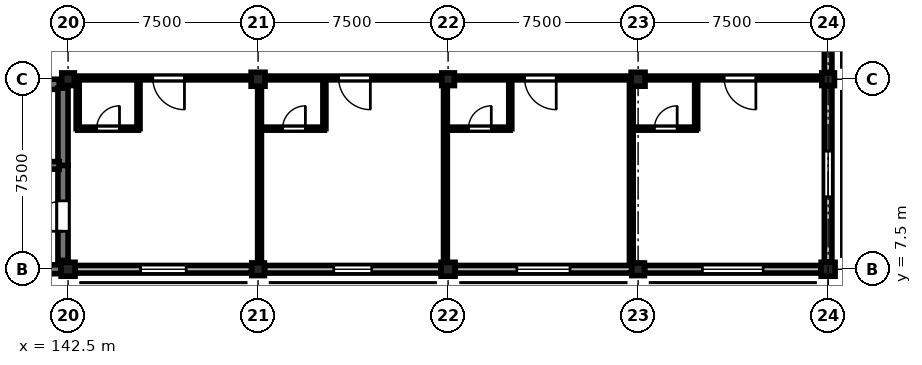
"""IFC4 building model, lengths in metres.
Left out: names, types, materials, properties, quantities, classifications, styles, units other than length and angle.
Written with IfcOpenShell. Run it as: python <this file> out.ifc"""

import sys

from ifc_helpers import new_model, si_unit, direction, frame, frame_2d, origin, origin_2d, place, context, subcontext, project, spatial, rectangle, extrude, element, fill, save


model = new_model("IFC4")
c1 = context("Model", 3, precision=1e-05, world=origin(), true_north=direction((0.0, 1.0)))
c2 = subcontext(c1, "Body", "Model", "MODEL_VIEW")
j1 = project(units=[si_unit("LENGTHUNIT", "METRE"), si_unit("PLANEANGLEUNIT", "RADIAN")], contexts=[c1])
p1 = place(None, origin())
s1 = spatial("IfcSite", under=j1, at=p1, CompositionType="ELEMENT")
p2 = place(p1, origin())
s2 = spatial("IfcBuilding", under=s1, at=p2, CompositionType="ELEMENT")
p3 = place(p2, frame((0.0, 0.0, 17.85)))
s3 = spatial("IfcBuildingStorey", under=s2, at=p3, CompositionType="ELEMENT", Elevation=17.85)
p4 = place(p3, frame((142.5, 7.5, 0.0), z_axis=(0.0, 0.0, 1.0), x_axis=(1.0, 0.0, 0.0)))
e1 = element("IfcColumn", 1, at=p4, inside=s3, PredefinedType="COLUMN", context=c2, shape_type="SweptSolid", body=[
    extrude(rectangle(XDim=0.55, YDim=0.55, at=origin_2d()), origin(), (0.0, 0.0, 1.0), 4.05),
])
for number, where, z_axis, x_axis in (
    (2, (142.5, 15.0, 0.0), (0.0, 0.0, 1.0), (1.0, 0.0, 0.0)),
    (3, (150.0, 7.5, 0.0), (0.0, 0.0, 1.0), (1.0, 0.0, 0.0)),
):
    element("IfcColumn", number, at=place(p3, frame(where, z_axis=z_axis, x_axis=x_axis)), inside=s3, PredefinedType="COLUMN", context=c2, shape_type="SweptSolid", body=[
        extrude(rectangle(XDim=0.5, YDim=0.5, at=origin_2d()), origin(), (0.0, 0.0, 1.0), 4.05),
    ])
for number, where, z_axis, x_axis in (
    (4, (150.0, 15.0, 0.0), (0.0, 0.0, 1.0), (1.0, 0.0, 0.0)),
    (5, (157.5, 7.5, 0.0), (0.0, 0.0, 1.0), (1.0, 0.0, 0.0)),
):
    element("IfcColumn", number, at=place(p3, frame(where, z_axis=z_axis, x_axis=x_axis)), inside=s3, PredefinedType="COLUMN", context=c2, shape_type="SweptSolid", body=[
        extrude(rectangle(XDim=0.55, YDim=0.55, at=origin_2d()), origin(), (0.0, 0.0, 1.0), 4.05),
    ])
for number, where, z_axis, x_axis in (
    (6, (157.5, 15.0, 0.0), (0.0, 0.0, 1.0), (1.0, 0.0, 0.0)),
    (7, (165.0, 7.5, 0.0), (0.0, 0.0, 1.0), (1.0, 0.0, 0.0)),
):
    element("IfcColumn", number, at=place(p3, frame(where, z_axis=z_axis, x_axis=x_axis)), inside=s3, PredefinedType="COLUMN", context=c2, shape_type="SweptSolid", body=[
        extrude(rectangle(XDim=0.5, YDim=0.5, at=origin_2d()), origin(), (0.0, 0.0, 1.0), 4.05),
    ])
for number, where, z_axis, x_axis in (
    (8, (165.0, 15.0, 0.0), (0.0, 0.0, 1.0), (1.0, 0.0, 0.0)),
    (9, (172.5, 7.5, 0.0), (0.0, 0.0, 1.0), (1.0, 0.0, 0.0)),
):
    element("IfcColumn", number, at=place(p3, frame(where, z_axis=z_axis, x_axis=x_axis)), inside=s3, PredefinedType="COLUMN", context=c2, shape_type="SweptSolid", body=[
        extrude(rectangle(XDim=0.55, YDim=0.55, at=origin_2d()), origin(), (0.0, 0.0, 1.0), 4.05),
    ])
p5 = place(p3, frame((172.5, 15.0, 0.0), z_axis=(0.0, 0.0, 1.0), x_axis=(1.0, 0.0, 0.0)))
e10 = element("IfcColumn", 10, at=p5, inside=s3, PredefinedType="COLUMN", context=c2, shape_type="SweptSolid", body=[
    extrude(rectangle(XDim=0.5, YDim=0.5, at=origin_2d()), origin(), (0.0, 0.0, 1.0), 4.05),
])
p6 = place(p3, frame((142.215, 7.5, 0.0), z_axis=(0.0, 0.0, 1.0), x_axis=(-1.0, 0.0, 0.0)))
e11 = element("IfcWall", 11, at=p6, inside=s3, PredefinedType="SHEAR", context=c2, shape_type="SweptSolid", body=[
    extrude(rectangle(XDim=6.955, YDim=0.35, at=frame_2d((3.478, 0.0))), origin(), (0.0, 0.0, 1.0), 3.77),
])
p7 = place(p3, frame((149.74, 7.5, 0.0), z_axis=(0.0, 0.0, 1.0), x_axis=(-1.0, 0.0, 0.0)))
e12 = element("IfcWall", 12, at=p7, inside=s3, PredefinedType="STANDARD", context=c2, shape_type="SweptSolid", body=[
    extrude(rectangle(XDim=6.955, YDim=0.3, at=frame_2d((3.478, 0.0))), origin(), (0.0, 0.0, 1.0), 3.17),
])
p8 = place(p7, frame((2.577, 0.0, 0.9)))
e13 = element("IfcOpeningElement", 13, at=p8, cuts=e12, PredefinedType="OPENING", context=c2, shape_type="SweptSolid", body=[
    extrude(rectangle(XDim=1.8, YDim=1.99, at=frame_2d((0.9, 0.995))), frame((0.0, 0.16, 0.0), z_axis=(0.0, -1.0, 0.0), x_axis=(1.0, 0.0, 0.0)), (0.0, 0.0, 1.0), 0.32),
])
p9 = place(p3, frame((157.215, 7.5, 0.0), z_axis=(0.0, 0.0, 1.0), x_axis=(-1.0, 0.0, 0.0)))
e14 = element("IfcWall", 14, at=p9, inside=s3, PredefinedType="STANDARD", context=c2, shape_type="SweptSolid", body=[
    extrude(rectangle(XDim=6.955, YDim=0.3, at=frame_2d((3.478, 0.0))), origin(), (0.0, 0.0, 1.0), 3.17),
])
p10 = place(p9, frame((2.728, 0.0, 0.9)))
e15 = element("IfcOpeningElement", 15, at=p10, cuts=e14, PredefinedType="OPENING", context=c2, shape_type="SweptSolid", body=[
    extrude(rectangle(XDim=1.5, YDim=1.99, at=frame_2d((0.75, 0.995))), frame((0.0, 0.16, 0.0), z_axis=(0.0, -1.0, 0.0), x_axis=(1.0, 0.0, 0.0)), (0.0, 0.0, 1.0), 0.32),
])
p11 = place(p3, frame((164.74, 7.5, 0.0), z_axis=(0.0, 0.0, 1.0), x_axis=(-1.0, 0.0, 0.0)))
e16 = element("IfcWall", 16, at=p11, inside=s3, PredefinedType="STANDARD", context=c2, shape_type="SweptSolid", body=[
    extrude(rectangle(XDim=6.955, YDim=0.3, at=frame_2d((3.478, 0.0))), origin(), (0.0, 0.0, 1.0), 3.17),
])
p12 = place(p11, frame((2.427, 0.0, 0.9)))
e17 = element("IfcOpeningElement", 17, at=p12, cuts=e16, PredefinedType="OPENING", context=c2, shape_type="SweptSolid", body=[
    extrude(rectangle(XDim=2.1, YDim=1.99, at=frame_2d((1.05, 0.995))), frame((0.0, 0.16, 0.0), z_axis=(0.0, -1.0, 0.0), x_axis=(1.0, 0.0, 0.0)), (0.0, 0.0, 1.0), 0.32),
])
p13 = place(p3, frame((172.215, 7.5, 0.0), z_axis=(0.0, 0.0, 1.0), x_axis=(-1.0, 0.0, 0.0)))
e18 = element("IfcWall", 18, at=p13, inside=s3, PredefinedType="STANDARD", context=c2, shape_type="SweptSolid", body=[
    extrude(rectangle(XDim=6.955, YDim=0.3, at=frame_2d((3.478, 0.0))), origin(), (0.0, 0.0, 1.0), 3.17),
])
p14 = place(p13, frame((2.278, 0.0, 0.9)))
e19 = element("IfcOpeningElement", 19, at=p14, cuts=e18, PredefinedType="OPENING", context=c2, shape_type="SweptSolid", body=[
    extrude(rectangle(XDim=2.4, YDim=1.99, at=frame_2d((1.2, 0.995))), frame((0.0, 0.16, 0.0), z_axis=(0.0, -1.0, 0.0), x_axis=(1.0, 0.0, 0.0)), (0.0, 0.0, 1.0), 0.32),
])
p15 = place(p3, frame((172.5, 14.74, 0.0), z_axis=(0.0, 0.0, 1.0), x_axis=(0.0, -1.0, 0.0)))
e20 = element("IfcWall", 20, at=p15, inside=s3, PredefinedType="STANDARD", context=c2, shape_type="SweptSolid", body=[
    extrude(rectangle(XDim=6.955, YDim=0.3, at=frame_2d((3.478, 0.0))), origin(), (0.0, 0.0, 1.0), 3.17),
])
p16 = place(p15, frame((2.577, 0.0, 0.9)))
e21 = element("IfcOpeningElement", 21, at=p16, cuts=e20, PredefinedType="OPENING", context=c2, shape_type="SweptSolid", body=[
    extrude(rectangle(XDim=1.8, YDim=1.99, at=frame_2d((0.9, 0.995))), frame((0.0, 0.16, 0.0), z_axis=(0.0, -1.0, 0.0), x_axis=(1.0, 0.0, 0.0)), (0.0, 0.0, 1.0), 0.32),
])
p17 = place(p3, frame((172.5, 22.215, 0.0), z_axis=(0.0, 0.0, 1.0), x_axis=(0.0, -1.0, 0.0)))
e22 = element("IfcWall", 22, at=p17, inside=s3, PredefinedType="STANDARD", context=c2, shape_type="SweptSolid", body=[
    extrude(rectangle(XDim=6.955, YDim=0.3, at=frame_2d((3.478, 0.0))), origin(), (0.0, 0.0, 1.0), 3.17),
])
p18 = place(p17, frame((2.728, 0.0, 0.9)))
e23 = element("IfcOpeningElement", 23, at=p18, cuts=e22, PredefinedType="OPENING", context=c2, shape_type="SweptSolid", body=[
    extrude(rectangle(XDim=1.5, YDim=1.99, at=frame_2d((0.75, 0.995))), frame((0.0, 0.16, 0.0), z_axis=(0.0, -1.0, 0.0), x_axis=(1.0, 0.0, 0.0)), (0.0, 0.0, 1.0), 0.32),
])
p19 = place(p3, frame((127.85, 14.8, 0.0), z_axis=(0.0, 0.0, 1.0), x_axis=(1.0, 0.0, 0.0)))
e24 = element("IfcWall", 24, at=p19, inside=s3, PredefinedType="SHEAR", context=c2, shape_type="SweptSolid", body=[
    extrude(rectangle(XDim=14.3, YDim=0.4, at=frame_2d((7.15, 0.0))), origin(), (0.0, 0.0, 1.0), 3.77),
])
p20 = place(p3, frame((142.3, 7.85, 0.0), z_axis=(0.0, 0.0, 1.0), x_axis=(0.0, 1.0, 0.0)))
e25 = element("IfcWall", 25, at=p20, inside=s3, PredefinedType="SHEAR", context=c2, shape_type="SweptSolid", body=[
    extrude(rectangle(XDim=3.75, YDim=0.4, at=frame_2d((1.875, 0.0))), origin(), (0.0, 0.0, 1.0), 3.77),
])
p21 = place(p20, frame((1.15, 0.0, 0.0)))
e26 = element("IfcOpeningElement", 26, at=p21, cuts=e25, PredefinedType="OPENING", context=c2, shape_type="SweptSolid", body=[
    extrude(rectangle(XDim=1.2, YDim=2.25, at=frame_2d((0.6, 1.125))), frame((0.0, 0.21, 0.0), z_axis=(0.0, -1.0, 0.0), x_axis=(1.0, 0.0, 0.0)), (0.0, 0.0, 1.0), 0.42),
])
p22 = place(p3, frame((142.3, 11.6, 0.0), z_axis=(0.0, 0.0, 1.0), x_axis=(0.0, 1.0, 0.0)))
e27 = element("IfcWall", 27, at=p22, inside=s3, PredefinedType="SHEAR", context=c2, shape_type="SweptSolid", body=[
    extrude(rectangle(XDim=3.05, YDim=0.4, at=frame_2d((1.525, 0.0))), origin(), (0.0, 0.0, 1.0), 3.77),
])
p23 = place(p3, frame((135.9, 11.6, 0.0), z_axis=(0.0, 0.0, 1.0), x_axis=(1.0, 0.0, 0.0)))
e28 = element("IfcWall", 28, at=p23, inside=s3, PredefinedType="SHEAR", context=c2, shape_type="SweptSolid", body=[
    extrude(rectangle(XDim=6.25, YDim=0.3, at=frame_2d((3.125, 0.0))), origin(), (0.0, 0.0, 1.0), 3.77),
])
p24 = place(p23, frame((0.95, 0.0, 0.0)))
e29 = element("IfcOpeningElement", 29, at=p24, cuts=e28, PredefinedType="OPENING", context=c2, shape_type="SweptSolid", body=[
    extrude(rectangle(XDim=1.3, YDim=2.2, at=frame_2d((0.65, 1.1))), frame((0.0, 0.16, 0.0), z_axis=(0.0, -1.0, 0.0), x_axis=(1.0, 0.0, 0.0)), (0.0, 0.0, 1.0), 0.32),
])
p25 = place(p23, frame((4.15, 0.0, 0.0)))
e30 = element("IfcOpeningElement", 30, at=p25, cuts=e28, PredefinedType="OPENING", context=c2, shape_type="SweptSolid", body=[
    extrude(rectangle(XDim=1.3, YDim=2.2, at=frame_2d((0.65, 1.1))), frame((0.0, 0.16, 0.0), z_axis=(0.0, -1.0, 0.0), x_axis=(1.0, 0.0, 0.0)), (0.0, 0.0, 1.0), 0.32),
])
p26 = place(p3, frame((150.058, 15.05, 0.0), z_axis=(0.0, 0.0, 1.0), x_axis=(-1.0, 0.0, 0.0)))
e31 = element("IfcWall", 31, at=p26, inside=s3, PredefinedType="PARTITIONING", context=c2, shape_type="SweptSolid", body=[
    extrude(rectangle(XDim=7.178, YDim=0.15, at=frame_2d((3.589, 0.0))), origin(), (0.0, 0.0, 1.0), 3.205),
])
p27 = place(p26, frame((2.964, 0.0, 0.0)))
e32 = element("IfcOpeningElement", 32, at=p27, cuts=e31, PredefinedType="OPENING", context=c2, shape_type="SweptSolid", body=[
    extrude(rectangle(XDim=1.25, YDim=2.2, at=frame_2d((0.625, 1.1))), frame((0.0, 0.085, 0.0), z_axis=(0.0, -1.0, 0.0), x_axis=(1.0, 0.0, 0.0)), (0.0, 0.0, 1.0), 0.17),
])
p28 = place(p3, frame((142.88, 13.05, 0.0), z_axis=(0.0, 0.0, 1.0), x_axis=(1.0, 0.0, 0.0)))
e33 = element("IfcWall", 33, at=p28, inside=s3, PredefinedType="PARTITIONING", context=c2, shape_type="SweptSolid", body=[
    extrude(rectangle(XDim=2.4, YDim=0.12, at=frame_2d((1.2, 0.0))), origin(), (0.0, 0.0, 1.0), 3.755),
])
p29 = place(p28, frame((0.75, 0.0, 0.0)))
e34 = element("IfcOpeningElement", 34, at=p29, cuts=e33, PredefinedType="OPENING", context=c2, shape_type="SweptSolid", body=[
    extrude(rectangle(XDim=0.9, YDim=2.1, at=frame_2d((0.45, 1.05))), frame((0.0, 0.07, 0.0), z_axis=(0.0, -1.0, 0.0), x_axis=(1.0, 0.0, 0.0)), (0.0, 0.0, 1.0), 0.14),
])
p30 = place(p3, frame((145.28, 13.05, 0.0), z_axis=(0.0, 0.0, 1.0), x_axis=(0.0, 1.0, 0.0)))
e35 = element("IfcWall", 35, at=p30, inside=s3, PredefinedType="PARTITIONING", context=c2, shape_type="SweptSolid", body=[
    extrude(rectangle(XDim=2.0, YDim=0.12, at=frame_2d((1.0, 0.0))), origin(), (0.0, 0.0, 1.0), 3.755),
])
p31 = place(p3, frame((157.395, 15.05, 0.0), z_axis=(0.0, 0.0, 1.0), x_axis=(-1.0, 0.0, 0.0)))
e36 = element("IfcWall", 36, at=p31, inside=s3, PredefinedType="PARTITIONING", context=c2, shape_type="SweptSolid", body=[
    extrude(rectangle(XDim=7.177, YDim=0.15, at=frame_2d((3.589, 0.0))), origin(), (0.0, 0.0, 1.0), 3.155),
])
p32 = place(p31, frame((2.964, 0.0, 0.0)))
e37 = element("IfcOpeningElement", 37, at=p32, cuts=e36, PredefinedType="OPENING", context=c2, shape_type="SweptSolid", body=[
    extrude(rectangle(XDim=1.25, YDim=2.2, at=frame_2d((0.625, 1.1))), frame((0.0, 0.085, 0.0), z_axis=(0.0, -1.0, 0.0), x_axis=(1.0, 0.0, 0.0)), (0.0, 0.0, 1.0), 0.17),
])
p33 = place(p3, frame((150.218, 13.05, 0.0), z_axis=(0.0, 0.0, 1.0), x_axis=(1.0, 0.0, 0.0)))
e38 = element("IfcWall", 38, at=p33, inside=s3, PredefinedType="PARTITIONING", context=c2, shape_type="SweptSolid", body=[
    extrude(rectangle(XDim=2.4, YDim=0.12, at=frame_2d((1.2, 0.0))), origin(), (0.0, 0.0, 1.0), 3.755),
])
p34 = place(p33, frame((0.75, 0.0, 0.0)))
e39 = element("IfcOpeningElement", 39, at=p34, cuts=e38, PredefinedType="OPENING", context=c2, shape_type="SweptSolid", body=[
    extrude(rectangle(XDim=0.9, YDim=2.1, at=frame_2d((0.45, 1.05))), frame((0.0, 0.07, 0.0), z_axis=(0.0, -1.0, 0.0), x_axis=(1.0, 0.0, 0.0)), (0.0, 0.0, 1.0), 0.14),
])
p35 = place(p3, frame((152.617, 13.05, 0.0), z_axis=(0.0, 0.0, 1.0), x_axis=(0.0, 1.0, 0.0)))
e40 = element("IfcWall", 40, at=p35, inside=s3, PredefinedType="PARTITIONING", context=c2, shape_type="SweptSolid", body=[
    extrude(rectangle(XDim=2.0, YDim=0.12, at=frame_2d((1.0, 0.0))), origin(), (0.0, 0.0, 1.0), 3.755),
])
p36 = place(p3, frame((164.732, 15.05, 0.0), z_axis=(0.0, 0.0, 1.0), x_axis=(-1.0, 0.0, 0.0)))
e41 = element("IfcWall", 41, at=p36, inside=s3, PredefinedType="PARTITIONING", context=c2, shape_type="SweptSolid", body=[
    extrude(rectangle(XDim=7.177, YDim=0.15, at=frame_2d((3.589, 0.0))), origin(), (0.0, 0.0, 1.0), 3.205),
])
p37 = place(p36, frame((2.964, 0.0, 0.0)))
e42 = element("IfcOpeningElement", 42, at=p37, cuts=e41, PredefinedType="OPENING", context=c2, shape_type="SweptSolid", body=[
    extrude(rectangle(XDim=1.25, YDim=2.2, at=frame_2d((0.625, 1.1))), frame((0.0, 0.085, 0.0), z_axis=(0.0, -1.0, 0.0), x_axis=(1.0, 0.0, 0.0)), (0.0, 0.0, 1.0), 0.17),
])
p38 = place(p3, frame((157.555, 13.05, 0.0), z_axis=(0.0, 0.0, 1.0), x_axis=(1.0, 0.0, 0.0)))
e43 = element("IfcWall", 43, at=p38, inside=s3, PredefinedType="PARTITIONING", context=c2, shape_type="SweptSolid", body=[
    extrude(rectangle(XDim=2.4, YDim=0.12, at=frame_2d((1.2, 0.0))), origin(), (0.0, 0.0, 1.0), 3.755),
])
p39 = place(p38, frame((0.75, 0.0, 0.0)))
e44 = element("IfcOpeningElement", 44, at=p39, cuts=e43, PredefinedType="OPENING", context=c2, shape_type="SweptSolid", body=[
    extrude(rectangle(XDim=0.9, YDim=2.1, at=frame_2d((0.45, 1.05))), frame((0.0, 0.07, 0.0), z_axis=(0.0, -1.0, 0.0), x_axis=(1.0, 0.0, 0.0)), (0.0, 0.0, 1.0), 0.14),
])
p40 = place(p3, frame((159.955, 13.05, 0.0), z_axis=(0.0, 0.0, 1.0), x_axis=(0.0, 1.0, 0.0)))
e45 = element("IfcWall", 45, at=p40, inside=s3, PredefinedType="PARTITIONING", context=c2, shape_type="SweptSolid", body=[
    extrude(rectangle(XDim=2.0, YDim=0.12, at=frame_2d((1.0, 0.0))), origin(), (0.0, 0.0, 1.0), 3.755),
])
p41 = place(p3, frame((172.07, 15.05, 0.0), z_axis=(0.0, 0.0, 1.0), x_axis=(-1.0, 0.0, 0.0)))
e46 = element("IfcWall", 46, at=p41, inside=s3, PredefinedType="PARTITIONING", context=c2, shape_type="SweptSolid", body=[
    extrude(rectangle(XDim=7.177, YDim=0.15, at=frame_2d((3.589, 0.0))), origin(), (0.0, 0.0, 1.0), 3.155),
])
p42 = place(p41, frame((2.421, 0.0, 0.0)))
e47 = element("IfcOpeningElement", 47, at=p42, cuts=e46, PredefinedType="OPENING", context=c2, shape_type="SweptSolid", body=[
    extrude(rectangle(XDim=1.25, YDim=2.2, at=frame_2d((0.625, 1.1))), frame((0.0, 0.085, 0.0), z_axis=(0.0, -1.0, 0.0), x_axis=(1.0, 0.0, 0.0)), (0.0, 0.0, 1.0), 0.17),
])
p43 = place(p3, frame((164.893, 13.05, 0.0), z_axis=(0.0, 0.0, 1.0), x_axis=(1.0, 0.0, 0.0)))
e48 = element("IfcWall", 48, at=p43, inside=s3, PredefinedType="PARTITIONING", context=c2, shape_type="SweptSolid", body=[
    extrude(rectangle(XDim=2.4, YDim=0.12, at=frame_2d((1.2, 0.0))), origin(), (0.0, 0.0, 1.0), 3.755),
])
p44 = place(p43, frame((0.75, 0.0, 0.0)))
e49 = element("IfcOpeningElement", 49, at=p44, cuts=e48, PredefinedType="OPENING", context=c2, shape_type="SweptSolid", body=[
    extrude(rectangle(XDim=0.9, YDim=2.1, at=frame_2d((0.45, 1.05))), frame((0.0, 0.07, 0.0), z_axis=(0.0, -1.0, 0.0), x_axis=(1.0, 0.0, 0.0)), (0.0, 0.0, 1.0), 0.14),
])
p45 = place(p3, frame((167.292, 13.05, 0.0), z_axis=(0.0, 0.0, 1.0), x_axis=(0.0, 1.0, 0.0)))
e50 = element("IfcWall", 50, at=p45, inside=s3, PredefinedType="PARTITIONING", context=c2, shape_type="SweptSolid", body=[
    extrude(rectangle(XDim=2.0, YDim=0.12, at=frame_2d((1.0, 0.0))), origin(), (0.0, 0.0, 1.0), 3.755),
])
p46 = place(p3, frame((150.058, 7.85, 0.0), z_axis=(0.0, 0.0, 1.0), x_axis=(0.0, 1.0, 0.0)))
e51 = element("IfcWall", 51, at=p46, inside=s3, PredefinedType="PARTITIONING", context=c2, shape_type="SweptSolid", body=[
    extrude(rectangle(XDim=7.2, YDim=0.15, at=frame_2d((3.6, 0.0))), origin(), (0.0, 0.0, 1.0), 3.255),
])
p47 = place(p3, frame((157.395, 7.85, 0.0), z_axis=(0.0, 0.0, 1.0), x_axis=(0.0, 1.0, 0.0)))
e52 = element("IfcWall", 52, at=p47, inside=s3, PredefinedType="PARTITIONING", context=c2, shape_type="SweptSolid", body=[
    extrude(rectangle(XDim=7.2, YDim=0.15, at=frame_2d((3.6, 0.0))), origin(), (0.0, 0.0, 1.0), 3.205),
])
p48 = place(p3, frame((164.732, 7.85, 0.0), z_axis=(0.0, 0.0, 1.0), x_axis=(0.0, 1.0, 0.0)))
e53 = element("IfcWall", 53, at=p48, inside=s3, PredefinedType="PARTITIONING", context=c2, shape_type="SweptSolid", body=[
    extrude(rectangle(XDim=7.2, YDim=0.15, at=frame_2d((3.6, 0.0))), origin(), (0.0, 0.0, 1.0), 3.255),
])
p49 = place(p3, frame((142.88, 13.05, 0.0), z_axis=(0.0, 0.0, 1.0), x_axis=(0.0, 1.0, 0.0)))
e54 = element("IfcWall", 54, at=p49, inside=s3, PredefinedType="PARTITIONING", context=c2, shape_type="SweptSolid", body=[
    extrude(rectangle(XDim=2.0, YDim=0.12, at=frame_2d((1.0, 0.0))), origin(), (0.0, 0.0, 1.0), 3.205),
])
p50 = place(p8, origin())
e55 = element("IfcWindow", 55, at=p50, inside=s3, PartitioningType="SINGLE_PANEL", PredefinedType="WINDOW", context=c2, shape_type="SweptSolid", body=[
    extrude(rectangle(XDim=1.8, YDim=1.99, at=frame_2d((0.9, 0.995))), frame((0.0, 0.03, 0.0), z_axis=(0.0, -1.0, 0.0), x_axis=(1.0, 0.0, 0.0)), (0.0, 0.0, 1.0), 0.06),
])
fill(e13, e55)
p51 = place(p10, origin())
e56 = element("IfcWindow", 56, at=p51, inside=s3, PartitioningType="SINGLE_PANEL", PredefinedType="WINDOW", context=c2, shape_type="SweptSolid", body=[
    extrude(rectangle(XDim=1.5, YDim=1.99, at=frame_2d((0.75, 0.995))), frame((0.0, 0.03, 0.0), z_axis=(0.0, -1.0, 0.0), x_axis=(1.0, 0.0, 0.0)), (0.0, 0.0, 1.0), 0.06),
])
fill(e15, e56)
p52 = place(p12, origin())
e57 = element("IfcWindow", 57, at=p52, inside=s3, PartitioningType="SINGLE_PANEL", PredefinedType="WINDOW", context=c2, shape_type="SweptSolid", body=[
    extrude(rectangle(XDim=2.1, YDim=1.99, at=frame_2d((1.05, 0.995))), frame((0.0, 0.03, 0.0), z_axis=(0.0, -1.0, 0.0), x_axis=(1.0, 0.0, 0.0)), (0.0, 0.0, 1.0), 0.06),
])
fill(e17, e57)
p53 = place(p14, origin())
e58 = element("IfcWindow", 58, at=p53, inside=s3, PartitioningType="SINGLE_PANEL", PredefinedType="WINDOW", context=c2, shape_type="SweptSolid", body=[
    extrude(rectangle(XDim=2.4, YDim=1.99, at=frame_2d((1.2, 0.995))), frame((0.0, 0.03, 0.0), z_axis=(0.0, -1.0, 0.0), x_axis=(1.0, 0.0, 0.0)), (0.0, 0.0, 1.0), 0.06),
])
fill(e19, e58)
p54 = place(p16, origin())
e59 = element("IfcWindow", 59, at=p54, inside=s3, PartitioningType="SINGLE_PANEL", PredefinedType="WINDOW", context=c2, shape_type="SweptSolid", body=[
    extrude(rectangle(XDim=1.8, YDim=1.99, at=frame_2d((0.9, 0.995))), frame((0.0, 0.03, 0.0), z_axis=(0.0, -1.0, 0.0), x_axis=(1.0, 0.0, 0.0)), (0.0, 0.0, 1.0), 0.06),
])
fill(e21, e59)
p55 = place(p21, origin())
e60 = element("IfcDoor", 60, at=p55, inside=s3, OperationType="SINGLE_SWING_LEFT", PredefinedType="DOOR", context=c2, shape_type="SweptSolid", body=[
    extrude(rectangle(XDim=1.2, YDim=2.25, at=frame_2d((0.6, 1.125))), frame((0.0, 0.025, 0.0), z_axis=(0.0, -1.0, 0.0), x_axis=(1.0, 0.0, 0.0)), (0.0, 0.0, 1.0), 0.05),
])
fill(e26, e60)
p56 = place(p27, origin())
e61 = element("IfcDoor", 61, at=p56, inside=s3, OperationType="SINGLE_SWING_LEFT", PredefinedType="DOOR", context=c2, shape_type="SweptSolid", body=[
    extrude(rectangle(XDim=1.25, YDim=2.2, at=frame_2d((0.625, 1.1))), frame((0.0, 0.025, 0.0), z_axis=(0.0, -1.0, 0.0), x_axis=(1.0, 0.0, 0.0)), (0.0, 0.0, 1.0), 0.05),
])
fill(e32, e61)
p57 = place(p29, origin())
e62 = element("IfcDoor", 62, at=p57, inside=s3, OperationType="SINGLE_SWING_RIGHT", PredefinedType="DOOR", context=c2, shape_type="SweptSolid", body=[
    extrude(rectangle(XDim=0.9, YDim=2.1, at=frame_2d((0.45, 1.05))), frame((0.0, 0.025, 0.0), z_axis=(0.0, -1.0, 0.0), x_axis=(1.0, 0.0, 0.0)), (0.0, 0.0, 1.0), 0.05),
])
fill(e34, e62)
p58 = place(p32, origin())
e63 = element("IfcDoor", 63, at=p58, inside=s3, OperationType="SINGLE_SWING_LEFT", PredefinedType="DOOR", context=c2, shape_type="SweptSolid", body=[
    extrude(rectangle(XDim=1.25, YDim=2.2, at=frame_2d((0.625, 1.1))), frame((0.0, 0.025, 0.0), z_axis=(0.0, -1.0, 0.0), x_axis=(1.0, 0.0, 0.0)), (0.0, 0.0, 1.0), 0.05),
])
fill(e37, e63)
p59 = place(p34, origin())
e64 = element("IfcDoor", 64, at=p59, inside=s3, OperationType="SINGLE_SWING_RIGHT", PredefinedType="DOOR", context=c2, shape_type="SweptSolid", body=[
    extrude(rectangle(XDim=0.9, YDim=2.1, at=frame_2d((0.45, 1.05))), frame((0.0, 0.025, 0.0), z_axis=(0.0, -1.0, 0.0), x_axis=(1.0, 0.0, 0.0)), (0.0, 0.0, 1.0), 0.05),
])
fill(e39, e64)
p60 = place(p37, origin())
e65 = element("IfcDoor", 65, at=p60, inside=s3, OperationType="SINGLE_SWING_LEFT", PredefinedType="DOOR", context=c2, shape_type="SweptSolid", body=[
    extrude(rectangle(XDim=1.25, YDim=2.2, at=frame_2d((0.625, 1.1))), frame((0.0, 0.025, 0.0), z_axis=(0.0, -1.0, 0.0), x_axis=(1.0, 0.0, 0.0)), (0.0, 0.0, 1.0), 0.05),
])
fill(e42, e65)
p61 = place(p39, origin())
e66 = element("IfcDoor", 66, at=p61, inside=s3, OperationType="SINGLE_SWING_RIGHT", PredefinedType="DOOR", context=c2, shape_type="SweptSolid", body=[
    extrude(rectangle(XDim=0.9, YDim=2.1, at=frame_2d((0.45, 1.05))), frame((0.0, 0.025, 0.0), z_axis=(0.0, -1.0, 0.0), x_axis=(1.0, 0.0, 0.0)), (0.0, 0.0, 1.0), 0.05),
])
fill(e44, e66)
p62 = place(p42, origin())
e67 = element("IfcDoor", 67, at=p62, inside=s3, OperationType="SINGLE_SWING_LEFT", PredefinedType="DOOR", context=c2, shape_type="SweptSolid", body=[
    extrude(rectangle(XDim=1.25, YDim=2.2, at=frame_2d((0.625, 1.1))), frame((0.0, 0.025, 0.0), z_axis=(0.0, -1.0, 0.0), x_axis=(1.0, 0.0, 0.0)), (0.0, 0.0, 1.0), 0.05),
])
fill(e47, e67)
p63 = place(p44, origin())
e68 = element("IfcDoor", 68, at=p63, inside=s3, OperationType="SINGLE_SWING_RIGHT", PredefinedType="DOOR", context=c2, shape_type="SweptSolid", body=[
    extrude(rectangle(XDim=0.9, YDim=2.1, at=frame_2d((0.45, 1.05))), frame((0.0, 0.025, 0.0), z_axis=(0.0, -1.0, 0.0), x_axis=(1.0, 0.0, 0.0)), (0.0, 0.0, 1.0), 0.05),
])
fill(e49, e68)
save(model, sys.argv[1])
